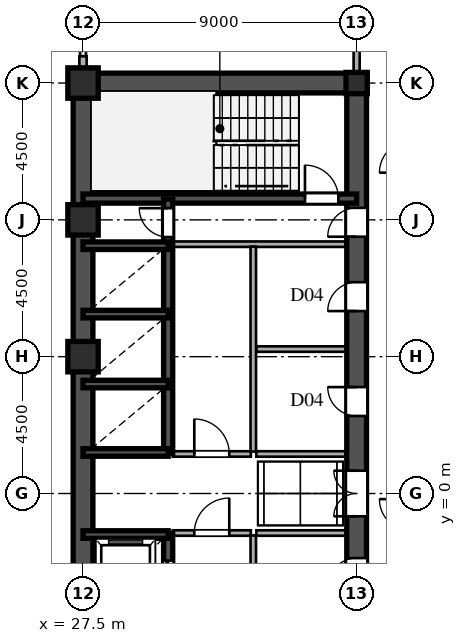
"""IFC4 building model, lengths in metres.
Left out: names, types, materials, properties, quantities, classifications, styles, units other than length and angle.
Written with IfcOpenShell. Run it as: python <this file> out.ifc"""

import sys

from ifc_helpers import new_model, si_unit, direction, frame, frame_2d, origin, origin_2d, place, context, subcontext, project, spatial, rectangle, hollow_rectangle, i_section, extrude, source, transform, mapped, element, fill, save


model = new_model("IFC4")
c1 = context("Model", 3, precision=1e-05, world=origin(), true_north=direction((0.0, 1.0)))
c2 = subcontext(c1, "Body", "Model", "MODEL_VIEW")
j1 = project(units=[si_unit("LENGTHUNIT", "METRE"), si_unit("PLANEANGLEUNIT", "RADIAN")], contexts=[c1])
p1 = place(None, origin())
s1 = spatial("IfcSite", under=j1, at=p1, CompositionType="ELEMENT")
p2 = place(p1, origin())
s2 = spatial("IfcBuilding", under=s1, at=p2, CompositionType="ELEMENT")
p3 = place(p2, frame((0.0, 0.0, 114.0)))
s3 = spatial("IfcBuildingStorey", under=s2, at=p3, CompositionType="ELEMENT", Elevation=114.0)
m1 = source(origin(), c2, "Body", "SweptSolid", [
    extrude(hollow_rectangle(XDim=1.0, YDim=1.0, WallThickness=0.042, at=origin_2d()), origin(), (0.0, 0.0, 1.0), 3.6),
])
for number, where, z_axis, x_axis in (
    (1, (27.5, 4.5, 0.0), (0.0, 0.0, 1.0), (1.0, 0.0, 0.0)),
    (2, (27.5, 9.0, 0.0), (0.0, 0.0, 1.0), (1.0, 0.0, 0.0)),
    (3, (27.5, 13.5, 0.0), (0.0, 0.0, 1.0), (1.0, 0.0, 0.0)),
):
    element("IfcColumn", number, at=place(p3, frame(where, z_axis=z_axis, x_axis=x_axis)), inside=s3, PredefinedType="COLUMN", context=c2, shape_type="MappedRepresentation", body=[
        mapped(m1, transform((0.0, 0.0, 0.0), scale=1.0)),
    ])
m2 = source(origin(), c2, "Body", "SweptSolid", [
    extrude(i_section(OverallWidth=0.7, OverallDepth=0.7, WebThickness=0.028, FlangeThickness=0.045, at=origin_2d()), origin(), (0.0, 0.0, 1.0), 3.6),
])
p4 = place(p3, frame((36.5, 13.5, 0.0), z_axis=(0.0, 0.0, 1.0), x_axis=(1.0, 0.0, 0.0)))
e4 = element("IfcColumn", 4, at=p4, inside=s3, PredefinedType="COLUMN", context=c2, shape_type="MappedRepresentation", body=[
    mapped(m2, transform((0.0, 0.0, 0.0), scale=1.0)),
])
p5 = place(p3, frame((27.5, 13.83, 0.0), z_axis=(0.0, 0.0, 1.0), x_axis=(0.0, 1.0, 0.0)))
e5 = element("IfcWall", 5, at=p5, inside=s3, PredefinedType="SOLIDWALL", context=c2, shape_type="SweptSolid", body=[
    extrude(rectangle(XDim=0.55, YDim=0.24, at=frame_2d((0.275, 0.0))), origin(), (0.0, 0.0, 1.0), 2.88),
])
for number, where, z_axis, x_axis in (
    (6, (27.5, -13.5, 0.0), (0.0, 0.0, 1.0), (0.0, 1.0, 0.0)),
    (7, (27.5, 1.3, 0.0), (0.0, 0.0, 1.0), (0.0, 1.0, 0.0)),
):
    element("IfcWall", number, at=place(p3, frame(where, z_axis=z_axis, x_axis=x_axis)), inside=s3, PredefinedType="SHEAR", context=c2, shape_type="SweptSolid", body=[
        extrude(rectangle(XDim=12.2, YDim=0.65, at=frame_2d((6.1, 0.0))), origin(), (0.0, 0.0, 1.0), 3.38),
    ])
p6 = place(p3, frame((27.5, -1.3, 0.0), z_axis=(0.0, 0.0, 1.0), x_axis=(0.0, 1.0, 0.0)))
e8 = element("IfcWall", 8, at=p6, inside=s3, PredefinedType="SHEAR", context=c2, shape_type="SweptSolid", body=[
    extrude(rectangle(XDim=2.6, YDim=0.65, at=frame_2d((1.3, 0.0))), origin(), (0.0, 0.0, 1.0), 3.38),
])
p7 = place(p3, frame((27.5, 13.5, 0.0), z_axis=(0.0, 0.0, 1.0), x_axis=(1.0, 0.0, 0.0)))
e9 = element("IfcWall", 9, at=p7, inside=s3, PredefinedType="SHEAR", context=c2, shape_type="SweptSolid", body=[
    extrude(rectangle(XDim=9.0, YDim=0.65, at=frame_2d((4.5, 0.0))), origin(), (0.0, 0.0, 1.0), 3.38),
])
p8 = place(p3, frame((36.5, -1.3, 0.0), z_axis=(0.0, 0.0, 1.0), x_axis=(0.0, 1.0, 0.0)))
e10 = element("IfcWall", 10, at=p8, inside=s3, PredefinedType="SHEAR", context=c2, shape_type="SweptSolid", body=[
    extrude(rectangle(XDim=2.6, YDim=0.65, at=frame_2d((1.3, 0.0))), origin(), (0.0, 0.0, 1.0), 3.38),
])
p9 = place(p8, frame((0.55, 0.0, 0.0)))
e11 = element("IfcOpeningElement", 11, at=p9, cuts=e10, PredefinedType="OPENING", context=c2, shape_type="SweptSolid", body=[
    extrude(rectangle(XDim=1.5, YDim=2.3, at=frame_2d((0.75, 1.15))), frame((0.0, 0.335, 0.0), z_axis=(0.0, -1.0, 0.0), x_axis=(1.0, 0.0, 0.0)), (0.0, 0.0, 1.0), 0.67),
])
p10 = place(p3, frame((36.5, 8.2, 0.0), z_axis=(0.0, 0.0, 1.0), x_axis=(0.0, 1.0, 0.0)))
e12 = element("IfcWall", 12, at=p10, inside=s3, PredefinedType="SHEAR", context=c2, shape_type="SweptSolid", body=[
    extrude(rectangle(XDim=5.45, YDim=0.65, at=frame_2d((2.725, 0.0))), origin(), (0.0, 0.0, 1.0), 3.38),
])
p11 = place(p10, frame((0.245, 0.0, 0.0)))
e13 = element("IfcOpeningElement", 13, at=p11, cuts=e12, PredefinedType="OPENING", context=c2, shape_type="SweptSolid", body=[
    extrude(rectangle(XDim=0.95, YDim=2.15, at=frame_2d((0.475, 1.075))), frame((0.0, 0.335, 0.0), z_axis=(0.0, -1.0, 0.0), x_axis=(1.0, 0.0, 0.0)), (0.0, 0.0, 1.0), 0.67),
])
p12 = place(p3, frame((36.5, -3.9, 0.0), z_axis=(0.0, 0.0, 1.0), x_axis=(0.0, 1.0, 0.0)))
e14 = element("IfcWall", 14, at=p12, inside=s3, PredefinedType="SHEAR", context=c2, shape_type="SweptSolid", body=[
    extrude(rectangle(XDim=2.6, YDim=0.65, at=frame_2d((1.3, 0.0))), origin(), (0.0, 0.0, 1.0), 3.38),
])
p13 = place(p12, frame((0.825, 0.0, 0.0)))
e15 = element("IfcOpeningElement", 15, at=p13, cuts=e14, PredefinedType="OPENING", context=c2, shape_type="SweptSolid", body=[
    extrude(rectangle(XDim=0.95, YDim=2.15, at=frame_2d((0.475, 1.075))), frame((0.0, 0.335, 0.0), z_axis=(0.0, -1.0, 0.0), x_axis=(1.0, 0.0, 0.0)), (0.0, 0.0, 1.0), 0.67),
])
p14 = place(p3, frame((36.5, 1.3, 0.0), z_axis=(0.0, 0.0, 1.0), x_axis=(0.0, 1.0, 0.0)))
e16 = element("IfcWall", 16, at=p14, inside=s3, PredefinedType="SHEAR", context=c2, shape_type="SweptSolid", body=[
    extrude(rectangle(XDim=3.45, YDim=0.65, at=frame_2d((1.725, 0.0))), origin(), (0.0, 0.0, 1.0), 3.38),
])
p15 = place(p14, frame((1.25, 0.0, 0.0)))
e17 = element("IfcOpeningElement", 17, at=p15, cuts=e16, PredefinedType="OPENING", context=c2, shape_type="SweptSolid", body=[
    extrude(rectangle(XDim=0.95, YDim=2.15, at=frame_2d((0.475, 1.075))), frame((0.0, 0.335, 0.0), z_axis=(0.0, -1.0, 0.0), x_axis=(1.0, 0.0, 0.0)), (0.0, 0.0, 1.0), 0.67),
])
p16 = place(p3, frame((36.5, 4.75, 0.0), z_axis=(0.0, 0.0, 1.0), x_axis=(0.0, 1.0, 0.0)))
e18 = element("IfcWall", 18, at=p16, inside=s3, PredefinedType="SHEAR", context=c2, shape_type="SweptSolid", body=[
    extrude(rectangle(XDim=3.45, YDim=0.65, at=frame_2d((1.725, 0.0))), origin(), (0.0, 0.0, 1.0), 3.38),
])
p17 = place(p16, frame((1.25, 0.0, 0.0)))
e19 = element("IfcOpeningElement", 19, at=p17, cuts=e18, PredefinedType="OPENING", context=c2, shape_type="SweptSolid", body=[
    extrude(rectangle(XDim=0.95, YDim=2.15, at=frame_2d((0.475, 1.075))), frame((0.0, 0.335, 0.0), z_axis=(0.0, -1.0, 0.0), x_axis=(1.0, 0.0, 0.0)), (0.0, 0.0, 1.0), 0.67),
])
p18 = place(p3, frame((27.5, 9.7, 0.0), z_axis=(0.0, 0.0, 1.0), x_axis=(1.0, 0.0, 0.0)))
e20 = element("IfcWall", 20, at=p18, inside=s3, PredefinedType="SHEAR", context=c2, shape_type="SweptSolid", body=[
    extrude(rectangle(XDim=9.0, YDim=0.3, at=frame_2d((4.5, 0.0))), origin(), (0.0, 0.0, 1.0), 3.38),
])
p19 = place(p18, frame((7.3, 0.0, 0.0)))
e21 = element("IfcOpeningElement", 21, at=p19, cuts=e20, PredefinedType="OPENING", context=c2, shape_type="SweptSolid", body=[
    extrude(rectangle(XDim=1.1, YDim=2.2, at=frame_2d((0.55, 1.1))), frame((0.0, 0.16, 0.0), z_axis=(0.0, -1.0, 0.0), x_axis=(1.0, 0.0, 0.0)), (0.0, 0.0, 1.0), 0.32),
])
for number, where, z_axis, x_axis in (
    (22, (27.5, -1.35, 0.0), (0.0, 0.0, 1.0), (1.0, 0.0, 0.0)),
    (23, (27.5, 1.35, 0.0), (0.0, 0.0, 1.0), (1.0, 0.0, 0.0)),
    (24, (27.5, 3.6, 0.0), (0.0, 0.0, 1.0), (1.0, 0.0, 0.0)),
    (25, (27.5, 5.9, 0.0), (0.0, 0.0, 1.0), (1.0, 0.0, 0.0)),
    (26, (27.5, 8.15, 0.0), (0.0, 0.0, 1.0), (1.0, 0.0, 0.0)),
):
    element("IfcWall", number, at=place(p3, frame(where, z_axis=z_axis, x_axis=x_axis)), inside=s3, PredefinedType="SHEAR", context=c2, shape_type="SweptSolid", body=[
        extrude(rectangle(XDim=2.8, YDim=0.25, at=frame_2d((1.4, 0.0))), origin(), (0.0, 0.0, 1.0), 3.38),
    ])
p20 = place(p3, frame((30.3, -4.2, 0.0), z_axis=(0.0, 0.0, 1.0), x_axis=(0.0, 1.0, 0.0)))
e27 = element("IfcWall", 27, at=p20, inside=s3, PredefinedType="SHEAR", context=c2, shape_type="SweptSolid", body=[
    extrude(rectangle(XDim=2.88, YDim=0.3, at=frame_2d((1.44, 0.0))), origin(), (0.0, 0.0, 1.0), 3.38),
])
p21 = place(p20, frame((0.89, 0.0, 0.0)))
e28 = element("IfcOpeningElement", 28, at=p21, cuts=e27, PredefinedType="OPENING", context=c2, shape_type="SweptSolid", body=[
    extrude(rectangle(XDim=1.1, YDim=2.2, at=frame_2d((0.55, 1.1))), frame((0.0, 0.16, 0.0), z_axis=(0.0, -1.0, 0.0), x_axis=(1.0, 0.0, 0.0)), (0.0, 0.0, 1.0), 0.32),
])
p22 = place(p3, frame((30.3, 1.32, 0.0), z_axis=(0.0, 0.0, 1.0), x_axis=(0.0, 1.0, 0.0)))
e29 = element("IfcWall", 29, at=p22, inside=s3, PredefinedType="SHEAR", context=c2, shape_type="SweptSolid", body=[
    extrude(rectangle(XDim=2.28, YDim=0.3, at=frame_2d((1.14, 0.0))), origin(), (0.0, 0.0, 1.0), 3.38),
])
p23 = place(p3, frame((30.3, 3.6, 0.0), z_axis=(0.0, 0.0, 1.0), x_axis=(0.0, 1.0, 0.0)))
e30 = element("IfcWall", 30, at=p23, inside=s3, PredefinedType="SHEAR", context=c2, shape_type="SweptSolid", body=[
    extrude(rectangle(XDim=2.3, YDim=0.3, at=frame_2d((1.15, 0.0))), origin(), (0.0, 0.0, 1.0), 3.38),
])
p24 = place(p3, frame((30.3, 5.9, 0.0), z_axis=(0.0, 0.0, 1.0), x_axis=(0.0, 1.0, 0.0)))
e31 = element("IfcWall", 31, at=p24, inside=s3, PredefinedType="SHEAR", context=c2, shape_type="SweptSolid", body=[
    extrude(rectangle(XDim=2.25, YDim=0.3, at=frame_2d((1.125, 0.0))), origin(), (0.0, 0.0, 1.0), 3.38),
])
p25 = place(p3, frame((30.3, 8.15, 0.0), z_axis=(0.0, 0.0, 1.0), x_axis=(0.0, 1.0, 0.0)))
e32 = element("IfcWall", 32, at=p25, inside=s3, PredefinedType="SHEAR", context=c2, shape_type="SweptSolid", body=[
    extrude(rectangle(XDim=1.53, YDim=0.3, at=frame_2d((0.765, 0.0))), origin(), (0.0, 0.0, 1.0), 3.38),
])
p26 = place(p25, frame((0.285, 0.0, 0.0)))
e33 = element("IfcOpeningElement", 33, at=p26, cuts=e32, PredefinedType="OPENING", context=c2, shape_type="SweptSolid", body=[
    extrude(rectangle(XDim=0.95, YDim=2.15, at=frame_2d((0.475, 1.075))), frame((0.0, 0.16, 0.0), z_axis=(0.0, -1.0, 0.0), x_axis=(1.0, 0.0, 0.0)), (0.0, 0.0, 1.0), 0.32),
])
p27 = place(p3, frame((30.45, 8.2, 0.0), z_axis=(0.0, 0.0, 1.0), x_axis=(1.0, 0.0, 0.0)))
e34 = element("IfcWall", 34, at=p27, inside=s3, PredefinedType="PARTITIONING", context=c2, shape_type="SweptSolid", body=[
    extrude(rectangle(XDim=5.7, YDim=0.18, at=frame_2d((2.85, 0.0))), origin(), (0.0, 0.0, 1.0), 3.38),
])
p28 = place(p3, frame((33.1, -6.42, 0.0), z_axis=(0.0, 0.0, 1.0), x_axis=(0.0, 1.0, 0.0)))
e35 = element("IfcWall", 35, at=p28, inside=s3, PredefinedType="PARTITIONING", context=c2, shape_type="SweptSolid", body=[
    extrude(rectangle(XDim=5.04, YDim=0.18, at=frame_2d((2.52, 0.0))), origin(), (0.0, 0.0, 1.0), 3.38),
])
p29 = place(p3, frame((33.1, 1.38, 0.0), z_axis=(0.0, 0.0, 1.0), x_axis=(0.0, 1.0, 0.0)))
e36 = element("IfcWall", 36, at=p29, inside=s3, PredefinedType="PARTITIONING", context=c2, shape_type="SweptSolid", body=[
    extrude(rectangle(XDim=6.74, YDim=0.18, at=frame_2d((3.37, 0.0))), origin(), (0.0, 0.0, 1.0), 3.38),
])
p30 = place(p3, frame((30.45, -1.3, 0.0), z_axis=(0.0, 0.0, 1.0), x_axis=(1.0, 0.0, 0.0)))
e37 = element("IfcWall", 37, at=p30, inside=s3, PredefinedType="PARTITIONING", context=c2, shape_type="SweptSolid", body=[
    extrude(rectangle(XDim=2.57, YDim=0.18, at=frame_2d((1.285, 0.0))), origin(), (0.0, 0.0, 1.0), 3.38),
])
p31 = place(p30, frame((0.71, 0.0, 0.0)))
e38 = element("IfcOpeningElement", 38, at=p31, cuts=e37, PredefinedType="OPENING", context=c2, shape_type="SweptSolid", body=[
    extrude(rectangle(XDim=1.15, YDim=2.2, at=frame_2d((0.575, 1.1))), frame((0.0, 0.1, 0.0), z_axis=(0.0, -1.0, 0.0), x_axis=(1.0, 0.0, 0.0)), (0.0, 0.0, 1.0), 0.2),
])
p32 = place(p3, frame((30.45, 1.3, 0.0), z_axis=(0.0, 0.0, 1.0), x_axis=(1.0, 0.0, 0.0)))
e39 = element("IfcWall", 39, at=p32, inside=s3, PredefinedType="PARTITIONING", context=c2, shape_type="SweptSolid", body=[
    extrude(rectangle(XDim=2.57, YDim=0.18, at=frame_2d((1.285, 0.0))), origin(), (0.0, 0.0, 1.0), 3.38),
])
p33 = place(p32, frame((0.71, 0.0, 0.0)))
e40 = element("IfcOpeningElement", 40, at=p33, cuts=e39, PredefinedType="OPENING", context=c2, shape_type="SweptSolid", body=[
    extrude(rectangle(XDim=1.15, YDim=2.2, at=frame_2d((0.575, 1.1))), frame((0.0, 0.1, 0.0), z_axis=(0.0, -1.0, 0.0), x_axis=(1.0, 0.0, 0.0)), (0.0, 0.0, 1.0), 0.2),
])
for number, where, z_axis, x_axis in (
    (41, (33.2, -1.3, 0.0), (0.0, 0.0, 1.0), (1.0, 0.0, 0.0)),
    (42, (33.2, 1.3, 0.0), (0.0, 0.0, 1.0), (1.0, 0.0, 0.0)),
    (43, (33.2, 4.75, 0.0), (0.0, 0.0, 1.0), (1.0, 0.0, 0.0)),
):
    element("IfcWall", number, at=place(p3, frame(where, z_axis=z_axis, x_axis=x_axis)), inside=s3, PredefinedType="PARTITIONING", context=c2, shape_type="SweptSolid", body=[
        extrude(rectangle(XDim=2.95, YDim=0.18, at=frame_2d((1.475, 0.0))), origin(), (0.0, 0.0, 1.0), 3.38),
    ])
p34 = place(p3, frame((36.5, 13.83, 0.0), z_axis=(0.0, 0.0, 1.0), x_axis=(0.0, 1.0, 0.0)))
e44 = element("IfcWall", 44, at=p34, inside=s3, PredefinedType="PARTITIONING", context=c2, shape_type="SweptSolid", body=[
    extrude(rectangle(XDim=1.685, YDim=0.2, at=frame_2d((0.842, 0.0))), origin(), (0.0, 0.0, 1.0), 2.78),
])
m3 = source(origin(), c2, "Body", "SweptSolid", [
    extrude(rectangle(XDim=1.5, YDim=2.3, at=frame_2d((0.75, 1.15))), frame((0.0, 0.025, 0.0), z_axis=(0.0, -1.0, 0.0), x_axis=(1.0, 0.0, 0.0)), (0.0, 0.0, 1.0), 0.05),
])
p35 = place(p9, origin())
e45 = element("IfcDoor", 45, at=p35, inside=s3, OperationType="DOUBLE_SWING_LEFT", PredefinedType="DOOR", context=c2, shape_type="MappedRepresentation", body=[
    mapped(m3, transform((0.0, 0.0, 0.0), scale=1.0)),
])
fill(e11, e45)
m4 = source(origin(), c2, "Body", "SweptSolid", [
    extrude(rectangle(XDim=0.95, YDim=2.15, at=frame_2d((0.475, 1.075))), frame((0.0, 0.025, 0.0), z_axis=(0.0, -1.0, 0.0), x_axis=(1.0, 0.0, 0.0)), (0.0, 0.0, 1.0), 0.05),
])
p36 = place(p11, origin())
e46 = element("IfcDoor", 46, at=p36, inside=s3, OperationType="SINGLE_SWING_LEFT", PredefinedType="DOOR", context=c2, shape_type="MappedRepresentation", body=[
    mapped(m4, transform((0.0, 0.0, 0.0), scale=1.0)),
])
fill(e13, e46)
p37 = place(p13, origin())
e47 = element("IfcDoor", 47, at=p37, inside=s3, OperationType="SINGLE_SWING_LEFT", PredefinedType="DOOR", context=c2, shape_type="MappedRepresentation", body=[
    mapped(m4, transform((0.0, 0.0, 0.0), scale=1.0)),
])
fill(e15, e47)
p38 = place(p15, origin())
e48 = element("IfcDoor", 48, at=p38, inside=s3, OperationType="SINGLE_SWING_RIGHT", PredefinedType="DOOR", context=c2, shape_type="MappedRepresentation", body=[
    mapped(m4, transform((0.0, 0.0, 0.0), scale=1.0)),
])
fill(e17, e48)
p39 = place(p17, origin())
e49 = element("IfcDoor", 49, at=p39, inside=s3, OperationType="SINGLE_SWING_LEFT", PredefinedType="DOOR", context=c2, shape_type="MappedRepresentation", body=[
    mapped(m4, transform((0.0, 0.0, 0.0), scale=1.0)),
])
fill(e19, e49)
m5 = source(origin(), c2, "Body", "SweptSolid", [
    extrude(rectangle(XDim=1.1, YDim=2.2, at=frame_2d((0.55, 1.1))), frame((0.0, 0.025, 0.0), z_axis=(0.0, -1.0, 0.0), x_axis=(1.0, 0.0, 0.0)), (0.0, 0.0, 1.0), 0.05),
])
p40 = place(p19, origin())
e50 = element("IfcDoor", 50, at=p40, inside=s3, OperationType="SINGLE_SWING_LEFT", PredefinedType="DOOR", context=c2, shape_type="MappedRepresentation", body=[
    mapped(m5, transform((0.0, 0.0, 0.0), scale=1.0)),
])
fill(e21, e50)
m6 = source(origin(), c2, "Body", "SweptSolid", [
    extrude(rectangle(XDim=1.1, YDim=2.2, at=frame_2d((0.55, 1.1))), frame((0.0, 0.025, 0.0), z_axis=(0.0, -1.0, 0.0), x_axis=(1.0, 0.0, 0.0)), (0.0, 0.0, 1.0), 0.05),
])
p41 = place(p21, origin())
e51 = element("IfcDoor", 51, at=p41, inside=s3, OperationType="DOUBLE_DOOR_SLIDING", PredefinedType="DOOR", context=c2, shape_type="MappedRepresentation", body=[
    mapped(m6, transform((0.0, 0.0, 0.0), scale=1.0)),
])
fill(e28, e51)
p42 = place(p26, origin())
e52 = element("IfcDoor", 52, at=p42, inside=s3, OperationType="SINGLE_SWING_RIGHT", PredefinedType="DOOR", context=c2, shape_type="MappedRepresentation", body=[
    mapped(m4, transform((0.0, 0.0, 0.0), scale=1.0)),
])
fill(e33, e52)
m7 = source(origin(), c2, "Body", "SweptSolid", [
    extrude(rectangle(XDim=1.15, YDim=2.2, at=frame_2d((0.575, 1.1))), frame((0.0, 0.025, 0.0), z_axis=(0.0, -1.0, 0.0), x_axis=(1.0, 0.0, 0.0)), (0.0, 0.0, 1.0), 0.05),
])
p43 = place(p31, origin())
e53 = element("IfcDoor", 53, at=p43, inside=s3, OperationType="SINGLE_SWING_RIGHT", PredefinedType="DOOR", context=c2, shape_type="MappedRepresentation", body=[
    mapped(m7, transform((0.0, 0.0, 0.0), scale=1.0)),
])
fill(e38, e53)
p44 = place(p33, origin())
e54 = element("IfcDoor", 54, at=p44, inside=s3, OperationType="SINGLE_SWING_LEFT", PredefinedType="DOOR", context=c2, shape_type="MappedRepresentation", body=[
    mapped(m7, transform((0.0, 0.0, 0.0), scale=1.0)),
])
fill(e40, e54)
save(model, sys.argv[1])
